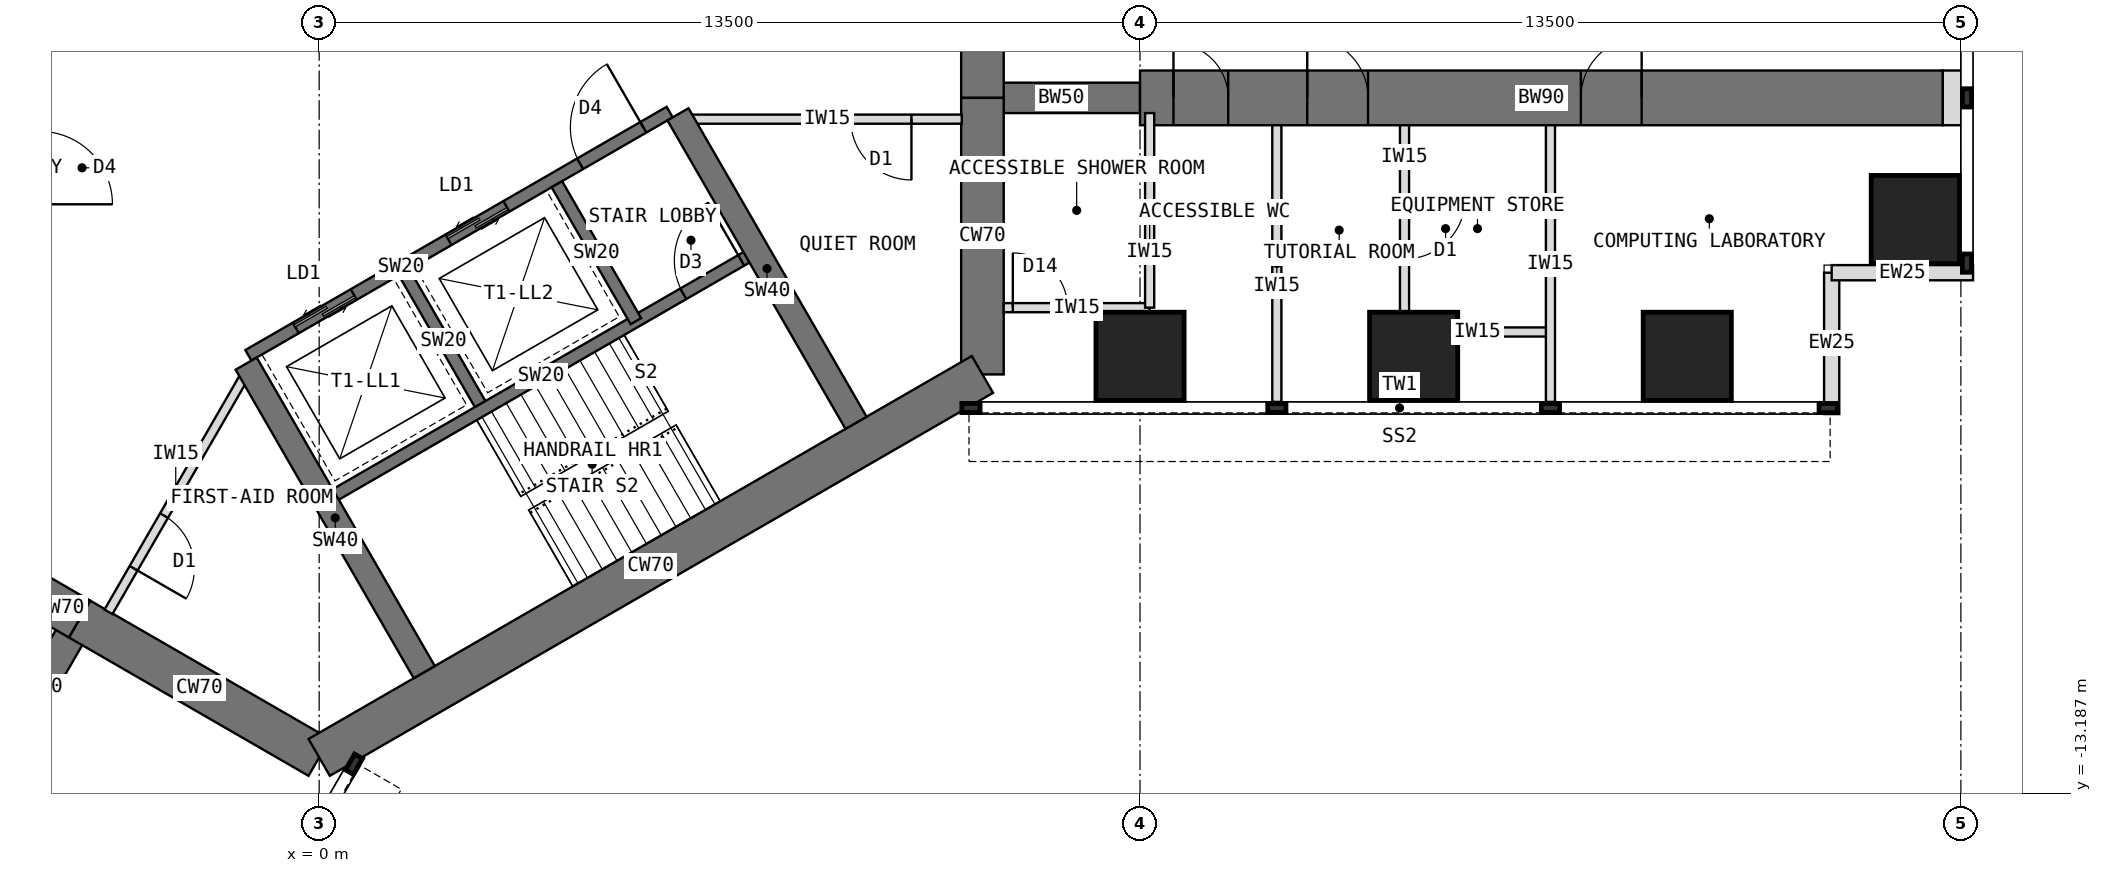
"""IFC4 building model, lengths in metres.
Left out: names, types, materials, properties, quantities, classifications, styles, units other than length and angle.
Written with IfcOpenShell. Run it as: python <this file> out.ifc"""

import sys

from ifc_helpers import new_model, si_unit, direction, frame, frame_2d, origin, origin_2d, place, context, subcontext, project, spatial, rectangle, extrude, element, fill, save


model = new_model("IFC4")
c1 = context("Model", 3, precision=1e-05, world=origin(), true_north=direction((0.0, 1.0)))
c2 = subcontext(c1, "Body", "Model", "MODEL_VIEW")
j1 = project(units=[si_unit("LENGTHUNIT", "METRE"), si_unit("PLANEANGLEUNIT", "RADIAN")], contexts=[c1])
p1 = place(None, origin())
s1 = spatial("IfcSite", under=j1, at=p1, CompositionType="ELEMENT")
p2 = place(p1, origin())
s2 = spatial("IfcBuilding", under=s1, at=p2, CompositionType="ELEMENT")
p3 = place(p2, frame((0.0, 0.0, 64.5)))
s3 = spatial("IfcBuildingStorey", under=s2, at=p3, CompositionType="ELEMENT", Elevation=64.5)
p4 = place(p3, frame((10.908, -6.298, 0.0), z_axis=(0.0, 0.0, 1.0), x_axis=(0.0, 1.0, 0.0)))
e1 = element("IfcWall", 1, at=p4, inside=s3, PredefinedType="SHEAR", context=c2, shape_type="SweptSolid", body=[
    extrude(rectangle(XDim=4.548, YDim=0.7, at=frame_2d((2.274, 0.0))), origin(), (0.0, 0.0, 1.0), 4.0),
])
p5 = place(p3, frame((10.908, -1.75, 0.0), z_axis=(0.0, 0.0, 1.0), x_axis=(0.0, 1.0, 0.0)))
e2 = element("IfcWall", 2, at=p5, inside=s3, PredefinedType="SHEAR", context=c2, shape_type="SweptSolid", body=[
    extrude(rectangle(XDim=3.5, YDim=0.7, at=frame_2d((1.75, 0.0))), origin(), (0.0, 0.0, 1.0), 4.0),
])
p6 = place(p5, frame((0.85, 0.0, 0.0)))
e3 = element("IfcOpeningElement", 3, at=p6, cuts=e2, PredefinedType="OPENING", context=c2, shape_type="SweptSolid", body=[
    extrude(rectangle(XDim=1.8, YDim=2.1, at=frame_2d((0.9, 1.05))), frame((0.0, 0.36, 0.0), z_axis=(0.0, -1.0, 0.0), x_axis=(1.0, 0.0, 0.0)), (0.0, 0.0, 1.0), 0.72),
])
p7 = place(p3, frame((-6.97, -8.572, 0.0), z_axis=(0.0, 0.0, 1.0), x_axis=(0.866019471182, -0.500010275428, 0.0)))
e4 = element("IfcWall", 4, at=p7, inside=s3, PredefinedType="SHEAR", context=c2, shape_type="SweptSolid", body=[
    extrude(rectangle(XDim=3.5, YDim=0.7, at=frame_2d((1.75, 0.0))), origin(), (0.0, 0.0, 1.0), 4.0),
])
p8 = place(p7, frame((0.85, 0.0, 0.0)))
e5 = element("IfcOpeningElement", 5, at=p8, cuts=e4, PredefinedType="OPENING", context=c2, shape_type="SweptSolid", body=[
    extrude(rectangle(XDim=1.8, YDim=2.1, at=frame_2d((0.9, 1.05))), frame((0.0, 0.36, 0.0), z_axis=(0.0, -1.0, 0.0), x_axis=(1.0, 0.0, 0.0)), (0.0, 0.0, 1.0), 0.72),
])
p9 = place(p3, frame((-3.939, -10.322, 0.0), z_axis=(0.0, 0.0, 1.0), x_axis=(0.866011268655, -0.500024481964, 0.0)))
e6 = element("IfcWall", 6, at=p9, inside=s3, PredefinedType="SHEAR", context=c2, shape_type="SweptSolid", body=[
    extrude(rectangle(XDim=4.548, YDim=0.7, at=frame_2d((2.274, 0.0))), origin(), (0.0, 0.0, 1.0), 4.0),
])
p10 = place(p3, frame((0.0, -12.596, 0.0), z_axis=(0.0, 0.0, 1.0), x_axis=(0.866021940709, 0.500005998175, 0.0)))
e7 = element("IfcWall", 7, at=p10, inside=s3, PredefinedType="SHEAR", context=c2, shape_type="SweptSolid", body=[
    extrude(rectangle(XDim=12.596, YDim=0.7, at=frame_2d((6.298, 0.0))), origin(), (0.0, 0.0, 1.0), 4.0),
])
p11 = place(p3, frame((10.908, -1.75, 0.0), z_axis=(0.0, 0.0, 1.0), x_axis=(1.0, 0.0, 0.0)))
e8 = element("IfcWall", 8, at=p11, inside=s3, PredefinedType="SHEAR", context=c2, shape_type="SweptSolid", body=[
    extrude(rectangle(XDim=2.592, YDim=0.5, at=frame_2d((1.296, 0.0))), origin(), (0.0, 0.0, 1.0), 4.0),
])
p12 = place(p3, frame((13.5, -1.75, 0.0), z_axis=(0.0, 0.0, 1.0), x_axis=(1.0, 0.0, 0.0)))
e9 = element("IfcWall", 9, at=p12, inside=s3, PredefinedType="SHEAR", context=c2, shape_type="SweptSolid", body=[
    extrude(rectangle(XDim=13.2, YDim=0.9, at=frame_2d((6.6, 0.0))), origin(), (0.0, 0.0, 1.0), 4.0),
])
p13 = place(p12, frame((0.55, 0.0, 0.0)))
e10 = element("IfcOpeningElement", 10, at=p13, cuts=e9, PredefinedType="OPENING", context=c2, shape_type="SweptSolid", body=[
    extrude(rectangle(XDim=0.9, YDim=2.1, at=frame_2d((0.45, 1.05))), frame((0.0, 0.46, 0.0), z_axis=(0.0, -1.0, 0.0), x_axis=(1.0, 0.0, 0.0)), (0.0, 0.0, 1.0), 0.92),
])
p14 = place(p12, frame((2.75, 0.0, 0.0)))
e11 = element("IfcOpeningElement", 11, at=p14, cuts=e9, PredefinedType="OPENING", context=c2, shape_type="SweptSolid", body=[
    extrude(rectangle(XDim=1.0, YDim=2.1, at=frame_2d((0.5, 1.05))), frame((0.0, 0.46, 0.0), z_axis=(0.0, -1.0, 0.0), x_axis=(1.0, 0.0, 0.0)), (0.0, 0.0, 1.0), 0.92),
])
p15 = place(p12, frame((7.25, 0.0, 0.0)))
e12 = element("IfcOpeningElement", 12, at=p15, cuts=e9, PredefinedType="OPENING", context=c2, shape_type="SweptSolid", body=[
    extrude(rectangle(XDim=1.0, YDim=2.1, at=frame_2d((0.5, 1.05))), frame((0.0, 0.46, 0.0), z_axis=(0.0, -1.0, 0.0), x_axis=(1.0, 0.0, 0.0)), (0.0, 0.0, 1.0), 0.92),
])
p16 = place(p3, frame((-3.939, -10.322, 0.0), z_axis=(0.0, 0.0, 1.0), x_axis=(-0.499918158782, -0.866072649678, 0.0)))
e13 = element("IfcWall", 13, at=p16, inside=s3, PredefinedType="SHEAR", context=c2, shape_type="SweptSolid", body=[
    extrude(rectangle(XDim=2.592, YDim=0.5, at=frame_2d((1.296, 0.0))), origin(), (0.0, 0.0, 1.0), 4.0),
])
for number, where, z_axis, x_axis in (
    (14, (13.5, -6.0, 0.0), (0.0, 0.0, 1.0), (1.0, 0.0, 0.0)),
    (15, (18.0, -6.0, 0.0), (0.0, 0.0, 1.0), (1.0, 0.0, 0.0)),
    (16, (22.5, -6.0, 0.0), (0.0, 0.0, 1.0), (1.0, 0.0, 0.0)),
    (17, (26.25, -3.75, 0.0), (0.0, 0.0, 1.0), (1.0, 0.0, 0.0)),
):
    element("IfcColumn", number, at=place(p3, frame(where, z_axis=z_axis, x_axis=x_axis)), inside=s3, PredefinedType="COLUMN", context=c2, shape_type="SweptSolid", body=[
        extrude(rectangle(XDim=1.45, YDim=1.45, at=origin_2d()), origin(), (0.0, 0.0, 1.0), 4.0),
    ])
for number, where, z_axis, x_axis in (
    (18, (24.875, -6.95, 0.0), (0.0, 0.0, 1.0), (0.0, 1.0, 0.0)),
    (19, (24.875, -4.625, 0.0), (0.0, 0.0, 1.0), (1.0, 0.0, 0.0)),
):
    element("IfcWall", number, at=place(p3, frame(where, z_axis=z_axis, x_axis=x_axis)), inside=s3, PredefinedType="STANDARD", context=c2, shape_type="SweptSolid", body=[
        extrude(rectangle(XDim=2.325, YDim=0.25, at=frame_2d((1.163, 0.0))), origin(), (0.0, 0.0, 1.0), 3.8),
    ])
p17 = place(p3, frame((26.7, -1.75, 0.0), z_axis=(0.0, 0.0, 1.0), x_axis=(1.0, 0.0, 0.0)))
e20 = element("IfcWall", 20, at=p17, inside=s3, PredefinedType="PARTITIONING", context=c2, shape_type="SweptSolid", body=[
    extrude(rectangle(XDim=0.31, YDim=0.9, at=frame_2d((0.155, 0.0))), origin(), (0.0, 0.0, 1.0), 3.8),
])
p18 = place(p3, frame((-1.164, -5.984, 0.0), z_axis=(0.0, 0.0, 1.0), x_axis=(0.866026010844, 0.49999894854, 0.0)))
e21 = element("IfcWall", 21, at=p18, inside=s3, PredefinedType="SHEAR", context=c2, shape_type="SweptSolid", body=[
    extrude(rectangle(XDim=8.0, YDim=0.2, at=frame_2d((4.0, 0.0))), origin(), (0.0, 0.0, 1.0), 4.0),
])
p19 = place(p18, frame((6.3, 0.0, 0.0)))
e22 = element("IfcOpeningElement", 22, at=p19, cuts=e21, PredefinedType="OPENING", context=c2, shape_type="SweptSolid", body=[
    extrude(rectangle(XDim=1.2, YDim=2.1, at=frame_2d((0.6, 1.05))), frame((0.0, 0.11, 0.0), z_axis=(0.0, -1.0, 0.0), x_axis=(1.0, 0.0, 0.0)), (0.0, 0.0, 1.0), 0.22),
])
p20 = place(p18, frame((0.9, 0.0, 0.0)))
e23 = element("IfcOpeningElement", 23, at=p20, cuts=e21, PredefinedType="OPENING", context=c2, shape_type="SweptSolid", body=[
    extrude(rectangle(XDim=1.1, YDim=2.2, at=frame_2d((0.55, 1.1))), frame((0.0, 0.11, 0.0), z_axis=(0.0, -1.0, 0.0), x_axis=(1.0, 0.0, 0.0)), (0.0, 0.0, 1.0), 0.22),
])
p21 = place(p18, frame((3.8, 0.0, 0.0)))
e24 = element("IfcOpeningElement", 24, at=p21, cuts=e21, PredefinedType="OPENING", context=c2, shape_type="SweptSolid", body=[
    extrude(rectangle(XDim=1.1, YDim=2.2, at=frame_2d((0.55, 1.1))), frame((0.0, 0.11, 0.0), z_axis=(0.0, -1.0, 0.0), x_axis=(1.0, 0.0, 0.0)), (0.0, 0.0, 1.0), 0.22),
])
p22 = place(p3, frame((1.397, -4.62, 0.0), z_axis=(0.0, 0.0, 1.0), x_axis=(0.499936506574, -0.866062058628, 0.0)))
e25 = element("IfcWall", 25, at=p22, inside=s3, PredefinedType="SHEAR", context=c2, shape_type="SweptSolid", body=[
    extrude(rectangle(XDim=2.6, YDim=0.2, at=frame_2d((1.3, 0.0))), origin(), (0.0, 0.0, 1.0), 4.0),
])
p23 = place(p3, frame((3.909, -3.17, 0.0), z_axis=(0.0, 0.0, 1.0), x_axis=(0.49997716683, -0.86603858612, 0.0)))
e26 = element("IfcWall", 26, at=p23, inside=s3, PredefinedType="SHEAR", context=c2, shape_type="SweptSolid", body=[
    extrude(rectangle(XDim=2.6, YDim=0.2, at=frame_2d((1.3, 0.0))), origin(), (0.0, 0.0, 1.0), 4.0),
])
p24 = place(p3, frame((0.186, -8.322, 0.0), z_axis=(0.0, 0.0, 1.0), x_axis=(0.866026010844, 0.49999894854, 0.0)))
e27 = element("IfcWall", 27, at=p24, inside=s3, PredefinedType="SHEAR", context=c2, shape_type="SweptSolid", body=[
    extrude(rectangle(XDim=8.0, YDim=0.2, at=frame_2d((4.0, 0.0))), origin(), (0.0, 0.0, 1.0), 4.0),
])
p25 = place(p24, frame((6.7, 0.0, 0.0)))
e28 = element("IfcOpeningElement", 28, at=p25, cuts=e27, PredefinedType="OPENING", context=c2, shape_type="SweptSolid", body=[
    extrude(rectangle(XDim=1.1, YDim=2.1, at=frame_2d((0.55, 1.05))), frame((0.0, 0.11, 0.0), z_axis=(0.0, -1.0, 0.0), x_axis=(1.0, 0.0, 0.0)), (0.0, 0.0, 1.0), 0.22),
])
for number, where, z_axis, x_axis in (
    (29, (5.901, -2.02, 0.0), (0.0, 0.0, 1.0), (0.5, -0.866, 0.0)),
    (30, (-1.201, -6.12, 0.0), (0.0, 0.0, 1.0), (0.5, -0.866, 0.0)),
):
    element("IfcWall", number, at=place(p3, frame(where, z_axis=z_axis, x_axis=x_axis)), inside=s3, PredefinedType="SHEAR", context=c2, shape_type="SweptSolid", body=[
        extrude(rectangle(XDim=5.858, YDim=0.4, at=frame_2d((2.929, 0.0))), origin(), (0.0, 0.0, 1.0), 4.0),
    ])
for number, where, z_axis, x_axis in (
    (31, (15.75, -2.2, 0.0), (0.0, 0.0, 1.0), (0.0, -1.0, 0.0)),
    (32, (20.25, -2.2, 0.0), (0.0, 0.0, 1.0), (0.0, -1.0, 0.0)),
):
    element("IfcWall", number, at=place(p3, frame(where, z_axis=z_axis, x_axis=x_axis)), inside=s3, PredefinedType="PARTITIONING", context=c2, shape_type="SweptSolid", body=[
        extrude(rectangle(XDim=4.55, YDim=0.15, at=frame_2d((2.275, 0.0))), origin(), (0.0, 0.0, 1.0), 3.8),
    ])
p26 = place(p3, frame((17.85, -5.6, 0.0), z_axis=(0.0, 0.0, 1.0), x_axis=(1.0, 0.0, 0.0)))
e33 = element("IfcWall", 33, at=p26, inside=s3, PredefinedType="PARTITIONING", context=c2, shape_type="SweptSolid", body=[
    extrude(rectangle(XDim=2.4, YDim=0.15, at=frame_2d((1.2, 0.0))), origin(), (0.0, 0.0, 1.0), 3.8),
])
p27 = place(p3, frame((17.85, -2.2, 0.0), z_axis=(0.0, 0.0, 1.0), x_axis=(0.0, -1.0, 0.0)))
e34 = element("IfcWall", 34, at=p27, inside=s3, PredefinedType="PARTITIONING", context=c2, shape_type="SweptSolid", body=[
    extrude(rectangle(XDim=3.4, YDim=0.15, at=frame_2d((1.7, 0.0))), origin(), (0.0, 0.0, 1.0), 3.8),
])
p28 = place(p27, frame((1.2, 0.0, 0.0)))
e35 = element("IfcOpeningElement", 35, at=p28, cuts=e34, PredefinedType="OPENING", context=c2, shape_type="SweptSolid", body=[
    extrude(rectangle(XDim=1.0, YDim=2.1, at=frame_2d((0.5, 1.05))), frame((0.0, 0.085, 0.0), z_axis=(0.0, -1.0, 0.0), x_axis=(1.0, 0.0, 0.0)), (0.0, 0.0, 1.0), 0.17),
])
p29 = place(p3, frame((11.258, -5.2, 0.0), z_axis=(0.0, 0.0, 1.0), x_axis=(1.0, 0.0, 0.0)))
e36 = element("IfcWall", 36, at=p29, inside=s3, PredefinedType="PARTITIONING", context=c2, shape_type="SweptSolid", body=[
    extrude(rectangle(XDim=2.4, YDim=0.15, at=frame_2d((1.2, 0.0))), origin(), (0.0, 0.0, 1.0), 3.8),
])
p30 = place(p29, frame((0.15, 0.0, 0.0)))
e37 = element("IfcOpeningElement", 37, at=p30, cuts=e36, PredefinedType="OPENING", context=c2, shape_type="SweptSolid", body=[
    extrude(rectangle(XDim=0.9, YDim=2.1, at=frame_2d((0.45, 1.05))), frame((0.0, 0.085, 0.0), z_axis=(0.0, -1.0, 0.0), x_axis=(1.0, 0.0, 0.0)), (0.0, 0.0, 1.0), 0.17),
])
p31 = place(p3, frame((13.658, -2.0, 0.0), z_axis=(0.0, 0.0, 1.0), x_axis=(0.0, -1.0, 0.0)))
e38 = element("IfcWall", 38, at=p31, inside=s3, PredefinedType="PARTITIONING", context=c2, shape_type="SweptSolid", body=[
    extrude(rectangle(XDim=3.2, YDim=0.15, at=frame_2d((1.6, 0.0))), origin(), (0.0, 0.0, 1.0), 3.8),
])
p32 = place(p3, frame((-1.253, -6.37, 0.0), z_axis=(0.0, 0.0, 1.0), x_axis=(-0.500007369519, -0.866021148949, 0.0)))
e39 = element("IfcWall", 39, at=p32, inside=s3, PredefinedType="PARTITIONING", context=c2, shape_type="SweptSolid", body=[
    extrude(rectangle(XDim=4.426, YDim=0.15, at=frame_2d((2.213, 0.0))), origin(), (0.0, 0.0, 1.0), 3.8),
])
p33 = place(p32, frame((2.598, 0.0, 0.0)))
e40 = element("IfcOpeningElement", 40, at=p33, cuts=e39, PredefinedType="OPENING", context=c2, shape_type="SweptSolid", body=[
    extrude(rectangle(XDim=1.0, YDim=2.1, at=frame_2d((0.5, 1.05))), frame((0.0, 0.085, 0.0), z_axis=(0.0, -1.0, 0.0), x_axis=(1.0, 0.0, 0.0)), (0.0, 0.0, 1.0), 0.17),
])
p34 = place(p3, frame((10.568, -2.1, 0.0), z_axis=(0.0, 0.0, 1.0), x_axis=(-1.0, 0.0, 0.0)))
e41 = element("IfcWall", 41, at=p34, inside=s3, PredefinedType="PARTITIONING", context=c2, shape_type="SweptSolid", body=[
    extrude(rectangle(XDim=4.426, YDim=0.15, at=frame_2d((2.213, 0.0))), origin(), (0.0, 0.0, 1.0), 3.8),
])
p35 = place(p34, frame((0.828, 0.0, 0.0)))
e42 = element("IfcOpeningElement", 42, at=p35, cuts=e41, PredefinedType="OPENING", context=c2, shape_type="SweptSolid", body=[
    extrude(rectangle(XDim=1.0, YDim=2.1, at=frame_2d((0.5, 1.05))), frame((0.0, 0.085, 0.0), z_axis=(0.0, -1.0, 0.0), x_axis=(1.0, 0.0, 0.0)), (0.0, 0.0, 1.0), 0.17),
])
p36 = place(p19, origin())
e43 = element("IfcDoor", 43, at=p36, inside=s3, OperationType="SINGLE_SWING_RIGHT", PredefinedType="DOOR", context=c2, shape_type="SweptSolid", body=[
    extrude(rectangle(XDim=1.2, YDim=2.1, at=frame_2d((0.6, 1.05))), frame((0.0, 0.025, 0.0), z_axis=(0.0, -1.0, 0.0), x_axis=(1.0, 0.0, 0.0)), (0.0, 0.0, 1.0), 0.05),
])
fill(e22, e43)
p37 = place(p20, origin())
e44 = element("IfcDoor", 44, at=p37, inside=s3, OperationType="DOUBLE_DOOR_SLIDING", PredefinedType="DOOR", context=c2, shape_type="SweptSolid", body=[
    extrude(rectangle(XDim=1.1, YDim=2.2, at=frame_2d((0.55, 1.1))), frame((0.0, 0.025, 0.0), z_axis=(0.0, -1.0, 0.0), x_axis=(1.0, 0.0, 0.0)), (0.0, 0.0, 1.0), 0.05),
])
fill(e23, e44)
p38 = place(p21, origin())
e45 = element("IfcDoor", 45, at=p38, inside=s3, OperationType="DOUBLE_DOOR_SLIDING", PredefinedType="DOOR", context=c2, shape_type="SweptSolid", body=[
    extrude(rectangle(XDim=1.1, YDim=2.2, at=frame_2d((0.55, 1.1))), frame((0.0, 0.025, 0.0), z_axis=(0.0, -1.0, 0.0), x_axis=(1.0, 0.0, 0.0)), (0.0, 0.0, 1.0), 0.05),
])
fill(e24, e45)
p39 = place(p25, origin())
e46 = element("IfcDoor", 46, at=p39, inside=s3, OperationType="SINGLE_SWING_RIGHT", PredefinedType="DOOR", context=c2, shape_type="SweptSolid", body=[
    extrude(rectangle(XDim=1.1, YDim=2.1, at=frame_2d((0.55, 1.05))), frame((0.0, 0.025, 0.0), z_axis=(0.0, -1.0, 0.0), x_axis=(1.0, 0.0, 0.0)), (0.0, 0.0, 1.0), 0.05),
])
fill(e28, e46)
p40 = place(p28, origin())
e47 = element("IfcDoor", 47, at=p40, inside=s3, OperationType="SINGLE_SWING_LEFT", PredefinedType="DOOR", context=c2, shape_type="SweptSolid", body=[
    extrude(rectangle(XDim=1.0, YDim=2.1, at=frame_2d((0.5, 1.05))), frame((0.0, 0.025, 0.0), z_axis=(0.0, -1.0, 0.0), x_axis=(1.0, 0.0, 0.0)), (0.0, 0.0, 1.0), 0.05),
])
fill(e35, e47)
p41 = place(p30, origin())
e48 = element("IfcDoor", 48, at=p41, inside=s3, OperationType="SINGLE_SWING_LEFT", PredefinedType="DOOR", context=c2, shape_type="SweptSolid", body=[
    extrude(rectangle(XDim=0.9, YDim=2.1, at=frame_2d((0.45, 1.05))), frame((0.0, 0.025, 0.0), z_axis=(0.0, -1.0, 0.0), x_axis=(1.0, 0.0, 0.0)), (0.0, 0.0, 1.0), 0.05),
])
fill(e37, e48)
p42 = place(p33, origin())
e49 = element("IfcDoor", 49, at=p42, inside=s3, OperationType="SINGLE_SWING_RIGHT", PredefinedType="DOOR", context=c2, shape_type="SweptSolid", body=[
    extrude(rectangle(XDim=1.0, YDim=2.1, at=frame_2d((0.5, 1.05))), frame((0.0, 0.025, 0.0), z_axis=(0.0, -1.0, 0.0), x_axis=(1.0, 0.0, 0.0)), (0.0, 0.0, 1.0), 0.05),
])
fill(e40, e49)
p43 = place(p35, origin())
e50 = element("IfcDoor", 50, at=p43, inside=s3, OperationType="SINGLE_SWING_LEFT", PredefinedType="DOOR", context=c2, shape_type="SweptSolid", body=[
    extrude(rectangle(XDim=1.0, YDim=2.1, at=frame_2d((0.5, 1.05))), frame((0.0, 0.025, 0.0), z_axis=(0.0, -1.0, 0.0), x_axis=(1.0, 0.0, 0.0)), (0.0, 0.0, 1.0), 0.05),
])
fill(e42, e50)
p44 = place(p13, origin())
e51 = element("IfcDoor", 51, at=p44, inside=s3, OperationType="SINGLE_SWING_LEFT", PredefinedType="DOOR", context=c2, shape_type="SweptSolid", body=[
    extrude(rectangle(XDim=0.82, YDim=2.06, at=frame_2d((0.45, 1.03))), frame((0.0, 0.025, 0.0), z_axis=(0.0, -1.0, 0.0), x_axis=(1.0, 0.0, 0.0)), (0.0, 0.0, 1.0), 0.05),
    extrude(rectangle(XDim=0.04, YDim=2.1, at=frame_2d((0.02, 1.05))), frame((0.0, 0.45, 0.0), z_axis=(0.0, -1.0, 0.0), x_axis=(1.0, 0.0, 0.0)), (0.0, 0.0, 1.0), 0.899),
    extrude(rectangle(XDim=0.04, YDim=2.1, at=frame_2d((0.88, 1.05))), frame((0.0, 0.45, 0.0), z_axis=(0.0, -1.0, 0.0), x_axis=(1.0, 0.0, 0.0)), (0.0, 0.0, 1.0), 0.899),
    extrude(rectangle(XDim=0.82, YDim=0.04, at=frame_2d((0.45, 2.08))), frame((0.0, 0.45, 0.0), z_axis=(0.0, -1.0, 0.0), x_axis=(1.0, 0.0, 0.0)), (0.0, 0.0, 1.0), 0.899),
])
fill(e10, e51)
p45 = place(p14, origin())
e52 = element("IfcDoor", 52, at=p45, inside=s3, OperationType="SINGLE_SWING_LEFT", PredefinedType="DOOR", context=c2, shape_type="SweptSolid", body=[
    extrude(rectangle(XDim=0.92, YDim=2.06, at=frame_2d((0.5, 1.03))), frame((0.0, 0.025, 0.0), z_axis=(0.0, -1.0, 0.0), x_axis=(1.0, 0.0, 0.0)), (0.0, 0.0, 1.0), 0.05),
    extrude(rectangle(XDim=0.04, YDim=2.1, at=frame_2d((0.02, 1.05))), frame((0.0, 0.45, 0.0), z_axis=(0.0, -1.0, 0.0), x_axis=(1.0, 0.0, 0.0)), (0.0, 0.0, 1.0), 0.899),
    extrude(rectangle(XDim=0.04, YDim=2.1, at=frame_2d((0.98, 1.05))), frame((0.0, 0.45, 0.0), z_axis=(0.0, -1.0, 0.0), x_axis=(1.0, 0.0, 0.0)), (0.0, 0.0, 1.0), 0.899),
    extrude(rectangle(XDim=0.92, YDim=0.04, at=frame_2d((0.5, 2.08))), frame((0.0, 0.45, 0.0), z_axis=(0.0, -1.0, 0.0), x_axis=(1.0, 0.0, 0.0)), (0.0, 0.0, 1.0), 0.899),
])
fill(e11, e52)
p46 = place(p15, origin())
e53 = element("IfcDoor", 53, at=p46, inside=s3, OperationType="SINGLE_SWING_RIGHT", PredefinedType="DOOR", context=c2, shape_type="SweptSolid", body=[
    extrude(rectangle(XDim=0.92, YDim=2.06, at=frame_2d((0.5, 1.03))), frame((0.0, 0.025, 0.0), z_axis=(0.0, -1.0, 0.0), x_axis=(1.0, 0.0, 0.0)), (0.0, 0.0, 1.0), 0.05),
    extrude(rectangle(XDim=0.04, YDim=2.1, at=frame_2d((0.02, 1.05))), frame((0.0, 0.45, 0.0), z_axis=(0.0, -1.0, 0.0), x_axis=(1.0, 0.0, 0.0)), (0.0, 0.0, 1.0), 0.899),
    extrude(rectangle(XDim=0.04, YDim=2.1, at=frame_2d((0.98, 1.05))), frame((0.0, 0.45, 0.0), z_axis=(0.0, -1.0, 0.0), x_axis=(1.0, 0.0, 0.0)), (0.0, 0.0, 1.0), 0.899),
    extrude(rectangle(XDim=0.92, YDim=0.04, at=frame_2d((0.5, 2.08))), frame((0.0, 0.45, 0.0), z_axis=(0.0, -1.0, 0.0), x_axis=(1.0, 0.0, 0.0)), (0.0, 0.0, 1.0), 0.899),
])
fill(e12, e53)
save(model, sys.argv[1])
